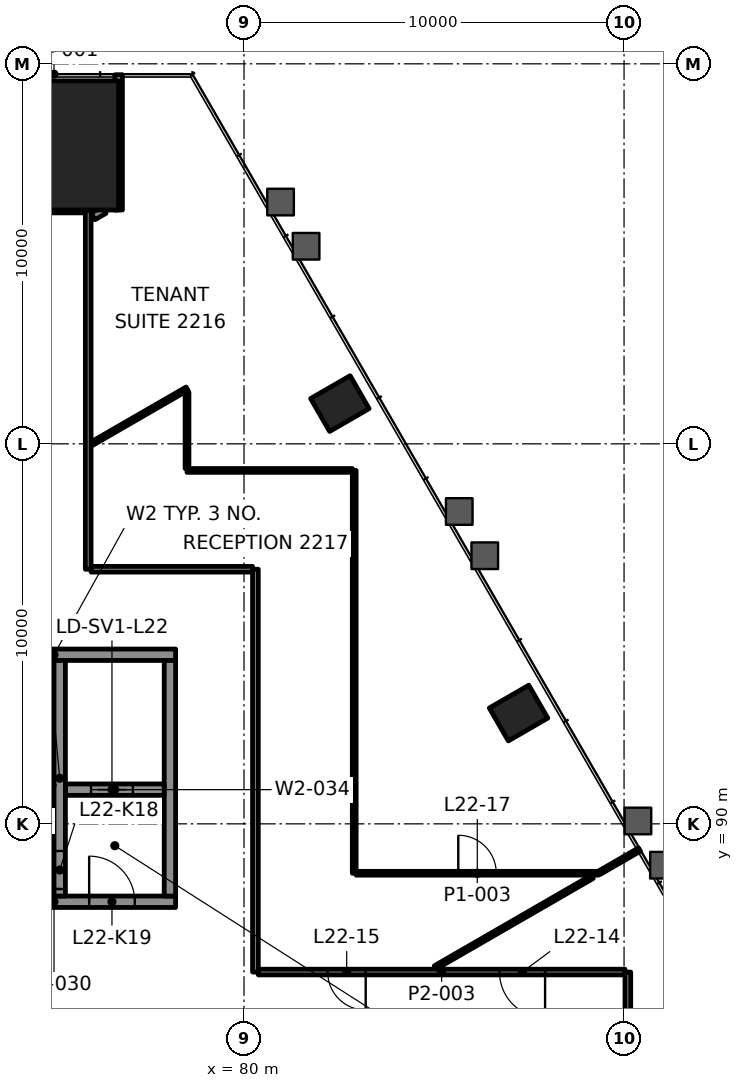
"""IFC4 building model, lengths in metres.
Left out: names, types, materials, properties, quantities, classifications, styles, units other than length and angle.
Written with IfcOpenShell. Run it as: python <this file> out.ifc"""

import sys

from ifc_helpers import new_model, si_unit, direction, frame, frame_2d, origin, origin_2d, place, context, subcontext, project, spatial, rectangle, extrude, element, fill, save


model = new_model("IFC4")
c1 = context("Model", 3, precision=1e-05, world=origin(), true_north=direction((0.0, 1.0)))
c2 = subcontext(c1, "Body", "Model", "MODEL_VIEW")
j1 = project(units=[si_unit("LENGTHUNIT", "METRE"), si_unit("PLANEANGLEUNIT", "RADIAN")], contexts=[c1])
p1 = place(None, origin())
s1 = spatial("IfcSite", under=j1, at=p1, CompositionType="ELEMENT")
p2 = place(p1, origin())
s2 = spatial("IfcBuilding", under=s1, at=p2, CompositionType="ELEMENT")
p3 = place(p2, frame((0.0, 0.0, 98.8)))
s3 = spatial("IfcBuildingStorey", under=s2, at=p3, CompositionType="ELEMENT", Elevation=98.8)
p4 = place(p3, frame((75.0, 107.853, 0.0), z_axis=(0.0, 0.0, 1.0), x_axis=(-1.0, 0.0, 0.0)))
e1 = element("IfcColumn", 1, at=p4, inside=s3, PredefinedType="COLUMN", context=c2, shape_type="SweptSolid", body=[
    extrude(rectangle(XDim=3.4, YDim=3.4, at=origin_2d()), origin(), (0.0, 0.0, 1.0), 4.2),
])
for number, where, z_axis, x_axis in (
    (2, (87.224, 92.916, -0.0), (0.0, 0.0, 1.0), (-0.5, 0.866, 0.0)),
    (3, (82.522, 101.059, -0.0), (0.0, 0.0, 1.0), (-0.5, 0.866, 0.0)),
):
    element("IfcColumn", number, at=place(p3, frame(where, z_axis=z_axis, x_axis=x_axis)), inside=s3, PredefinedType="COLUMN", context=c2, shape_type="SweptSolid", body=[
        extrude(rectangle(XDim=1.0, YDim=1.2, at=origin_2d()), origin(), (0.0, 0.0, 1.0), 4.2),
    ])
p5 = place(p3, frame((71.8, 87.95, 0.0), z_axis=(0.0, 0.0, 1.0), x_axis=(1.0, 0.0, 0.0)))
e4 = element("IfcWall", 4, at=p5, inside=s3, PredefinedType="SHEAR", context=c2, shape_type="SweptSolid", body=[
    extrude(rectangle(XDim=6.4, YDim=0.3, at=frame_2d((3.2, 0.0))), origin(), (0.0, 0.0, 1.0), 4.0),
])
p6 = place(p5, frame((1.325, 0.0, 0.0)))
e5 = element("IfcOpeningElement", 5, at=p6, cuts=e4, PredefinedType="OPENING", context=c2, shape_type="SweptSolid", body=[
    extrude(rectangle(XDim=1.0, YDim=2.1, at=frame_2d((0.5, 1.05))), frame((0.0, 0.16, 0.0), z_axis=(0.0, -1.0, 0.0), x_axis=(1.0, 0.0, 0.0)), (0.0, 0.0, 1.0), 0.32),
])
p7 = place(p5, frame((4.125, 0.0, 0.0)))
e6 = element("IfcOpeningElement", 6, at=p7, cuts=e4, PredefinedType="OPENING", context=c2, shape_type="SweptSolid", body=[
    extrude(rectangle(XDim=1.2, YDim=2.1, at=frame_2d((0.6, 1.05))), frame((0.0, 0.16, 0.0), z_axis=(0.0, -1.0, 0.0), x_axis=(1.0, 0.0, 0.0)), (0.0, 0.0, 1.0), 0.32),
])
p8 = place(p3, frame((71.8, 94.45, 0.0), z_axis=(0.0, 0.0, 1.0), x_axis=(1.0, 0.0, 0.0)))
e7 = element("IfcWall", 7, at=p8, inside=s3, PredefinedType="SHEAR", context=c2, shape_type="SweptSolid", body=[
    extrude(rectangle(XDim=6.4, YDim=0.3, at=frame_2d((3.2, 0.0))), origin(), (0.0, 0.0, 1.0), 4.0),
])
p9 = place(p3, frame((78.05, 88.1, 0.0), z_axis=(0.0, 0.0, 1.0), x_axis=(0.0, 1.0, 0.0)))
e8 = element("IfcWall", 8, at=p9, inside=s3, PredefinedType="SHEAR", context=c2, shape_type="SweptSolid", body=[
    extrude(rectangle(XDim=6.2, YDim=0.3, at=frame_2d((3.1, 0.0))), origin(), (0.0, 0.0, 1.0), 4.0),
])
p10 = place(p3, frame((75.3, 90.9, 0.0), z_axis=(0.0, 0.0, 1.0), x_axis=(1.0, 0.0, 0.0)))
e9 = element("IfcWall", 9, at=p10, inside=s3, PredefinedType="SHEAR", context=c2, shape_type="SweptSolid", body=[
    extrude(rectangle(XDim=2.6, YDim=0.3, at=frame_2d((1.3, 0.0))), origin(), (0.0, 0.0, 1.0), 4.0),
])
p11 = place(p10, frame((0.675, 0.0, 0.0)))
e10 = element("IfcOpeningElement", 10, at=p11, cuts=e9, PredefinedType="OPENING", context=c2, shape_type="SweptSolid", body=[
    extrude(rectangle(XDim=1.1, YDim=2.1, at=frame_2d((0.55, 1.05))), frame((0.0, 0.16, 0.0), z_axis=(0.0, -1.0, 0.0), x_axis=(1.0, 0.0, 0.0)), (0.0, 0.0, 1.0), 0.32),
])
p12 = place(p3, frame((75.15, 88.1, 0.0), z_axis=(0.0, 0.0, 1.0), x_axis=(0.0, 1.0, 0.0)))
e11 = element("IfcWall", 11, at=p12, inside=s3, PredefinedType="SHEAR", context=c2, shape_type="SweptSolid", body=[
    extrude(rectangle(XDim=6.2, YDim=0.3, at=frame_2d((3.1, 0.0))), origin(), (0.0, 0.0, 1.0), 4.0),
])
p13 = place(p12, frame((0.185, 0.0, 0.0)))
e12 = element("IfcOpeningElement", 12, at=p13, cuts=e11, PredefinedType="OPENING", context=c2, shape_type="SweptSolid", body=[
    extrude(rectangle(XDim=1.0, YDim=2.1, at=frame_2d((0.5, 1.05))), frame((0.0, 0.16, 0.0), z_axis=(0.0, -1.0, 0.0), x_axis=(1.0, 0.0, 0.0)), (0.0, 0.0, 1.0), 0.32),
])
p14 = place(p3, frame((90.024, 86.1, 0.0), z_axis=(0.0, 0.0, 1.0), x_axis=(-1.0, 0.0, 0.0)))
e13 = element("IfcWall", 13, at=p14, inside=s3, PredefinedType="PARTITIONING", context=c2, shape_type="SweptSolid", body=[
    extrude(rectangle(XDim=9.649, YDim=0.15, at=frame_2d((4.825, 0.0))), origin(), (0.0, 0.0, 1.0), 3.4),
])
p15 = place(p14, frame((2.103, 0.0, 0.0)))
e14 = element("IfcOpeningElement", 14, at=p15, cuts=e13, PredefinedType="OPENING", context=c2, shape_type="SweptSolid", body=[
    extrude(rectangle(XDim=1.2, YDim=2.1, at=frame_2d((0.6, 1.05))), frame((0.0, 0.085, 0.0), z_axis=(0.0, -1.0, 0.0), x_axis=(1.0, 0.0, 0.0)), (0.0, 0.0, 1.0), 0.17),
])
p16 = place(p14, frame((6.823, 0.0, 0.0)))
e15 = element("IfcOpeningElement", 15, at=p16, cuts=e13, PredefinedType="OPENING", context=c2, shape_type="SweptSolid", body=[
    extrude(rectangle(XDim=1.0, YDim=2.1, at=frame_2d((0.5, 1.05))), frame((0.0, 0.085, 0.0), z_axis=(0.0, -1.0, 0.0), x_axis=(1.0, 0.0, 0.0)), (0.0, 0.0, 1.0), 0.17),
])
p17 = place(p3, frame((82.95, 88.7, 0.0), z_axis=(0.0, 0.0, 1.0), x_axis=(1.0, 0.0, 0.0)))
e16 = element("IfcWall", 16, at=p17, inside=s3, PredefinedType="PARTITIONING", context=c2, shape_type="SweptSolid", body=[
    extrude(rectangle(XDim=6.376, YDim=0.1, at=frame_2d((3.188, 0.0))), origin(), (0.0, 0.0, 1.0), 3.4),
])
p18 = place(p17, frame((2.688, 0.0, 0.0)))
e17 = element("IfcOpeningElement", 17, at=p18, cuts=e16, PredefinedType="OPENING", context=c2, shape_type="SweptSolid", body=[
    extrude(rectangle(XDim=1.0, YDim=2.1, at=frame_2d((0.5, 1.05))), frame((0.0, 0.06, 0.0), z_axis=(0.0, -1.0, 0.0), x_axis=(1.0, 0.0, 0.0)), (0.0, 0.0, 1.0), 0.12),
])
p19 = place(p3, frame((75.975, 96.7, 0.0), z_axis=(0.0, 0.0, 1.0), x_axis=(1.0, 0.0, 0.0)))
e18 = element("IfcWall", 18, at=p19, inside=s3, PredefinedType="PARTITIONING", context=c2, shape_type="SweptSolid", body=[
    extrude(rectangle(XDim=4.25, YDim=0.15, at=frame_2d((2.125, 0.0))), origin(), (0.0, 0.0, 1.0), 3.4),
])
p20 = place(p3, frame((78.5, 99.3, 0.0), z_axis=(0.0, 0.0, 1.0), x_axis=(1.0, 0.0, 0.0)))
e19 = element("IfcWall", 19, at=p20, inside=s3, PredefinedType="PARTITIONING", context=c2, shape_type="SweptSolid", body=[
    extrude(rectangle(XDim=4.35, YDim=0.1, at=frame_2d((2.175, 0.0))), origin(), (0.0, 0.0, 1.0), 3.4),
])
p21 = place(p3, frame((74.176, 106.153, 0.0), z_axis=(0.0, 0.0, 1.0), x_axis=(1.0, 0.0, 0.0)))
e20 = element("IfcWall", 20, at=p21, inside=s3, PredefinedType="PARTITIONING", context=c2, shape_type="SweptSolid", body=[
    extrude(rectangle(XDim=1.649, YDim=0.15, at=frame_2d((0.824, 0.0))), origin(), (0.0, 0.0, 1.0), 3.397),
])
p22 = place(p3, frame((85.03, 86.22, 0.0), z_axis=(0.0, 0.0, 1.0), x_axis=(0.86602800421, 0.499995495904, 0.0)))
e21 = element("IfcWall", 21, at=p22, inside=s3, PredefinedType="PARTITIONING", context=c2, shape_type="SweptSolid", body=[
    extrude(rectangle(XDim=4.773, YDim=0.1, at=frame_2d((2.386, 0.0))), origin(), (0.0, 0.0, 1.0), 3.4),
])
p23 = place(p3, frame((76.001, 100.008, 0.0), z_axis=(0.0, 0.0, 1.0), x_axis=(0.866016514357, 0.500015396624, 0.0)))
e22 = element("IfcWall", 22, at=p23, inside=s3, PredefinedType="PARTITIONING", context=c2, shape_type="SweptSolid", body=[
    extrude(rectangle(XDim=2.886, YDim=0.1, at=frame_2d((1.443, 0.0))), origin(), (0.0, 0.0, 1.0), 3.4),
])
p24 = place(p3, frame((76.028, 105.984, 0.0), z_axis=(0.0, 0.0, 1.0), x_axis=(0.866137275136, 0.499806183056, 0.0)))
e23 = element("IfcWall", 23, at=p24, inside=s3, PredefinedType="PARTITIONING", context=c2, shape_type="SweptSolid", body=[
    extrude(rectangle(XDim=0.337, YDim=0.2, at=frame_2d((0.168, 0.0))), origin(), (0.0, 0.0, 1.0), 3.4),
])
p25 = place(p3, frame((90.1, 67.321, 0.0), z_axis=(0.0, 0.0, 1.0), x_axis=(0.0, 1.0, 0.0)))
e24 = element("IfcWall", 24, at=p25, inside=s3, PredefinedType="PARTITIONING", context=c2, shape_type="SweptSolid", body=[
    extrude(rectangle(XDim=18.778, YDim=0.15, at=frame_2d((9.389, 0.0))), origin(), (0.0, 0.0, 1.0), 3.4),
])
p26 = place(p3, frame((82.9, 88.7, 0.0), z_axis=(0.0, 0.0, 1.0), x_axis=(0.0, 1.0, 0.0)))
e25 = element("IfcWall", 25, at=p26, inside=s3, PredefinedType="PARTITIONING", context=c2, shape_type="SweptSolid", body=[
    extrude(rectangle(XDim=10.6, YDim=0.1, at=frame_2d((5.3, 0.0))), origin(), (0.0, 0.0, 1.0), 3.322),
])
p27 = place(p3, frame((80.3, 86.1, 0.0), z_axis=(0.0, 0.0, 1.0), x_axis=(0.0, 1.0, 0.0)))
e26 = element("IfcWall", 26, at=p27, inside=s3, PredefinedType="PARTITIONING", context=c2, shape_type="SweptSolid", body=[
    extrude(rectangle(XDim=10.6, YDim=0.15, at=frame_2d((5.3, 0.0))), origin(), (0.0, 0.0, 1.0), 3.322),
])
p28 = place(p3, frame((78.5, 99.35, 0.0), z_axis=(0.0, 0.0, 1.0), x_axis=(0.0, 1.0, 0.0)))
e27 = element("IfcWall", 27, at=p28, inside=s3, PredefinedType="PARTITIONING", context=c2, shape_type="SweptSolid", body=[
    extrude(rectangle(XDim=2.014, YDim=0.1, at=frame_2d((1.007, 0.0))), origin(), (0.0, 0.0, 1.0), 3.4),
])
p29 = place(p3, frame((76.7, 106.153, 0.0), z_axis=(0.0, 0.0, 1.0), x_axis=(0.0, 1.0, 0.0)))
e28 = element("IfcWall", 28, at=p29, inside=s3, PredefinedType="PARTITIONING", context=c2, shape_type="SweptSolid", body=[
    extrude(rectangle(XDim=3.559, YDim=0.2, at=frame_2d((1.78, 0.0))), origin(), (0.0, 0.0, 1.0), 3.4),
])
p30 = place(p3, frame((75.9, 96.7, 0.0), z_axis=(0.0, 0.0, 1.0), x_axis=(0.0, 1.0, 0.0)))
e29 = element("IfcWall", 29, at=p30, inside=s3, PredefinedType="PARTITIONING", context=c2, shape_type="SweptSolid", body=[
    extrude(rectangle(XDim=9.452, YDim=0.15, at=frame_2d((4.726, 0.0))), origin(), (0.0, 0.0, 1.0), 3.4),
])
p31 = place(p3, frame((89.347, 88.713, 0.0), z_axis=(0.0, 0.0, 1.0), x_axis=(0.866109108303, 0.499854991488, 0.0)))
e30 = element("IfcWall", 30, at=p31, inside=s3, PredefinedType="PARTITIONING", context=c2, shape_type="SweptSolid", body=[
    extrude(rectangle(XDim=1.222, YDim=0.1, at=frame_2d((0.611, 0.0))), origin(), (0.0, 0.0, 1.0), 3.165),
])
p32 = place(p15, origin())
e31 = element("IfcDoor", 31, at=p32, inside=s3, OperationType="DOUBLE_DOOR_SINGLE_SWING", PredefinedType="DOOR", context=c2, shape_type="SweptSolid", body=[
    extrude(rectangle(XDim=1.2, YDim=2.1, at=frame_2d((0.6, 1.05))), frame((0.0, 0.025, 0.0), z_axis=(0.0, -1.0, 0.0), x_axis=(1.0, 0.0, 0.0)), (0.0, 0.0, 1.0), 0.05),
])
fill(e14, e31)
p33 = place(p16, origin())
e32 = element("IfcDoor", 32, at=p33, inside=s3, OperationType="SINGLE_SWING_LEFT", PredefinedType="DOOR", context=c2, shape_type="SweptSolid", body=[
    extrude(rectangle(XDim=1.0, YDim=2.1, at=frame_2d((0.5, 1.05))), frame((0.0, 0.025, 0.0), z_axis=(0.0, -1.0, 0.0), x_axis=(1.0, 0.0, 0.0)), (0.0, 0.0, 1.0), 0.05),
])
fill(e15, e32)
p34 = place(p18, origin())
e33 = element("IfcDoor", 33, at=p34, inside=s3, OperationType="SINGLE_SWING_LEFT", PredefinedType="DOOR", context=c2, shape_type="SweptSolid", body=[
    extrude(rectangle(XDim=1.0, YDim=2.1, at=frame_2d((0.5, 1.05))), frame((0.0, 0.025, 0.0), z_axis=(0.0, -1.0, 0.0), x_axis=(1.0, 0.0, 0.0)), (0.0, 0.0, 1.0), 0.05),
])
fill(e17, e33)
p35 = place(p11, origin())
e34 = element("IfcDoor", 34, at=p35, inside=s3, OperationType="DOUBLE_DOOR_SLIDING", PredefinedType="DOOR", context=c2, shape_type="SweptSolid", body=[
    extrude(rectangle(XDim=1.1, YDim=2.1, at=frame_2d((0.55, 1.05))), frame((0.0, 0.025, 0.0), z_axis=(0.0, -1.0, 0.0), x_axis=(1.0, 0.0, 0.0)), (0.0, 0.0, 1.0), 0.05),
])
fill(e10, e34)
p36 = place(p13, origin())
e35 = element("IfcDoor", 35, at=p36, inside=s3, OperationType="SINGLE_SWING_LEFT", PredefinedType="DOOR", context=c2, shape_type="SweptSolid", body=[
    extrude(rectangle(XDim=1.0, YDim=2.1, at=frame_2d((0.5, 1.05))), frame((0.0, 0.025, 0.0), z_axis=(0.0, -1.0, 0.0), x_axis=(1.0, 0.0, 0.0)), (0.0, 0.0, 1.0), 0.05),
])
fill(e12, e35)
p37 = place(p7, origin())
e36 = element("IfcDoor", 36, at=p37, inside=s3, OperationType="SINGLE_SWING_RIGHT", PredefinedType="DOOR", context=c2, shape_type="SweptSolid", body=[
    extrude(rectangle(XDim=1.2, YDim=2.1, at=frame_2d((0.6, 1.05))), frame((0.0, 0.025, 0.0), z_axis=(0.0, -1.0, 0.0), x_axis=(1.0, 0.0, 0.0)), (0.0, 0.0, 1.0), 0.05),
])
fill(e6, e36)
save(model, sys.argv[1])
